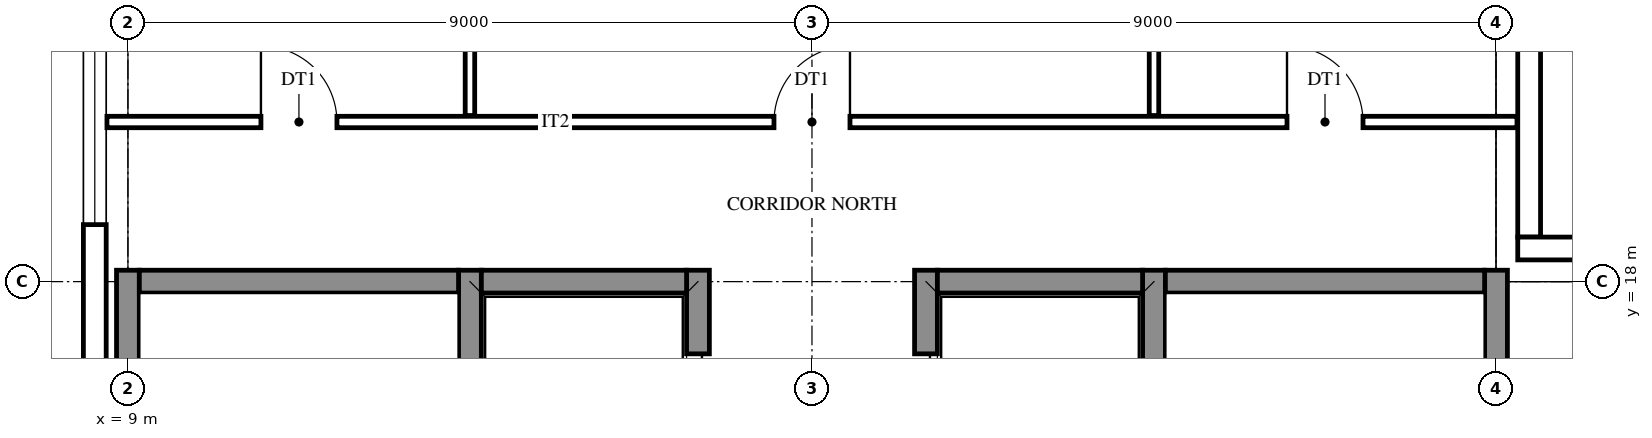
"""IFC4 building model, lengths in metres.
Left out: names, types, materials, properties, quantities, classifications, styles, units other than length and angle.
Written with IfcOpenShell. Run it as: python <this file> out.ifc"""

import sys

from ifc_helpers import new_model, si_unit, direction, frame, frame_2d, origin, place, context, subcontext, project, spatial, rectangle, extrude, element, fill, save


model = new_model("IFC4")
c1 = context("Model", 3, precision=1e-05, world=origin(), true_north=direction((0.0, 1.0)))
c2 = subcontext(c1, "Body", "Model", "MODEL_VIEW")
j1 = project(units=[si_unit("LENGTHUNIT", "METRE"), si_unit("PLANEANGLEUNIT", "RADIAN")], contexts=[c1])
p1 = place(None, origin())
s1 = spatial("IfcSite", under=j1, at=p1, CompositionType="ELEMENT")
p2 = place(p1, origin())
s2 = spatial("IfcBuilding", under=s1, at=p2, CompositionType="ELEMENT")
p3 = place(p2, frame((0.0, 0.0, 65.4)))
s3 = spatial("IfcBuildingStorey", under=s2, at=p3, CompositionType="ELEMENT", Elevation=65.4)
for number, where, z_axis, x_axis in (
    (1, (9.0, 8.85, 0.0), (0.0, 0.0, 1.0), (0.0, 1.0, 0.0)),
    (2, (13.5, 8.85, 0.0), (0.0, 0.0, 1.0), (0.0, 1.0, 0.0)),
):
    element("IfcWall", number, at=place(p3, frame(where, z_axis=z_axis, x_axis=x_axis)), inside=s3, PredefinedType="SHEAR", context=c2, shape_type="SweptSolid", body=[
        extrude(rectangle(XDim=9.3, YDim=0.3, at=frame_2d((4.65, 0.0))), origin(), (0.0, 0.0, 1.0), 4.5),
    ])
p4 = place(p3, frame((16.5, 8.85, 0.0), z_axis=(0.0, 0.0, 1.0), x_axis=(0.0, 1.0, 0.0)))
e3 = element("IfcWall", 3, at=p4, inside=s3, PredefinedType="SHEAR", context=c2, shape_type="SweptSolid", body=[
    extrude(rectangle(XDim=9.3, YDim=0.3, at=frame_2d((4.65, 0.0))), origin(), (0.0, 0.0, 1.0), 4.5),
])
p5 = place(p4, frame((1.1, 0.0, 0.0)))
e4 = element("IfcOpeningElement", 4, at=p5, cuts=e3, PredefinedType="OPENING", context=c2, shape_type="SweptSolid", body=[
    extrude(rectangle(XDim=1.1, YDim=2.1, at=frame_2d((0.55, 1.05))), frame((0.0, 0.16, 0.0), z_axis=(0.0, -1.0, 0.0), x_axis=(1.0, 0.0, 0.0)), (0.0, 0.0, 1.0), 0.32),
])
p6 = place(p4, frame((4.1, 0.0, 0.0)))
e5 = element("IfcOpeningElement", 5, at=p6, cuts=e3, PredefinedType="OPENING", context=c2, shape_type="SweptSolid", body=[
    extrude(rectangle(XDim=1.1, YDim=2.1, at=frame_2d((0.55, 1.05))), frame((0.0, 0.16, 0.0), z_axis=(0.0, -1.0, 0.0), x_axis=(1.0, 0.0, 0.0)), (0.0, 0.0, 1.0), 0.32),
])
p7 = place(p4, frame((7.1, 0.0, 0.0)))
e6 = element("IfcOpeningElement", 6, at=p7, cuts=e3, PredefinedType="OPENING", context=c2, shape_type="SweptSolid", body=[
    extrude(rectangle(XDim=1.1, YDim=2.1, at=frame_2d((0.55, 1.05))), frame((0.0, 0.16, 0.0), z_axis=(0.0, -1.0, 0.0), x_axis=(1.0, 0.0, 0.0)), (0.0, 0.0, 1.0), 0.32),
])
p8 = place(p3, frame((19.5, 8.85, 0.0), z_axis=(0.0, 0.0, 1.0), x_axis=(0.0, 1.0, 0.0)))
e7 = element("IfcWall", 7, at=p8, inside=s3, PredefinedType="SHEAR", context=c2, shape_type="SweptSolid", body=[
    extrude(rectangle(XDim=9.3, YDim=0.3, at=frame_2d((4.65, 0.0))), origin(), (0.0, 0.0, 1.0), 4.5),
])
p9 = place(p8, frame((1.1, 0.0, 0.0)))
e8 = element("IfcOpeningElement", 8, at=p9, cuts=e7, PredefinedType="OPENING", context=c2, shape_type="SweptSolid", body=[
    extrude(rectangle(XDim=1.1, YDim=2.1, at=frame_2d((0.55, 1.05))), frame((0.0, 0.16, 0.0), z_axis=(0.0, -1.0, 0.0), x_axis=(1.0, 0.0, 0.0)), (0.0, 0.0, 1.0), 0.32),
])
p10 = place(p8, frame((3.95, 0.0, 0.0)))
e9 = element("IfcOpeningElement", 9, at=p10, cuts=e7, PredefinedType="OPENING", context=c2, shape_type="SweptSolid", body=[
    extrude(rectangle(XDim=1.4, YDim=2.1, at=frame_2d((0.7, 1.05))), frame((0.0, 0.16, 0.0), z_axis=(0.0, -1.0, 0.0), x_axis=(1.0, 0.0, 0.0)), (0.0, 0.0, 1.0), 0.32),
])
p11 = place(p8, frame((7.1, 0.0, 0.0)))
e10 = element("IfcOpeningElement", 10, at=p11, cuts=e7, PredefinedType="OPENING", context=c2, shape_type="SweptSolid", body=[
    extrude(rectangle(XDim=1.1, YDim=2.1, at=frame_2d((0.55, 1.05))), frame((0.0, 0.16, 0.0), z_axis=(0.0, -1.0, 0.0), x_axis=(1.0, 0.0, 0.0)), (0.0, 0.0, 1.0), 0.32),
])
for number, where, z_axis, x_axis in (
    (11, (22.5, 8.85, 0.0), (0.0, 0.0, 1.0), (0.0, 1.0, 0.0)),
    (12, (27.0, 8.85, 0.0), (0.0, 0.0, 1.0), (0.0, 1.0, 0.0)),
):
    element("IfcWall", number, at=place(p3, frame(where, z_axis=z_axis, x_axis=x_axis)), inside=s3, PredefinedType="SHEAR", context=c2, shape_type="SweptSolid", body=[
        extrude(rectangle(XDim=9.3, YDim=0.3, at=frame_2d((4.65, 0.0))), origin(), (0.0, 0.0, 1.0), 4.5),
    ])
p12 = place(p3, frame((9.15, 18.0, 0.0), z_axis=(0.0, 0.0, 1.0), x_axis=(1.0, 0.0, 0.0)))
e13 = element("IfcWall", 13, at=p12, inside=s3, PredefinedType="SHEAR", context=c2, shape_type="SweptSolid", body=[
    extrude(rectangle(XDim=4.2, YDim=0.3, at=frame_2d((2.1, 0.0))), origin(), (0.0, 0.0, 1.0), 4.5),
])
for number, where, z_axis, x_axis in (
    (14, (13.65, 18.0, 0.0), (0.0, 0.0, 1.0), (1.0, 0.0, 0.0)),
    (15, (19.65, 18.0, 0.0), (0.0, 0.0, 1.0), (1.0, 0.0, 0.0)),
):
    element("IfcWall", number, at=place(p3, frame(where, z_axis=z_axis, x_axis=x_axis)), inside=s3, PredefinedType="SHEAR", context=c2, shape_type="SweptSolid", body=[
        extrude(rectangle(XDim=2.7, YDim=0.3, at=frame_2d((1.35, 0.0))), origin(), (0.0, 0.0, 1.0), 4.5),
    ])
p13 = place(p3, frame((22.65, 18.0, 0.0), z_axis=(0.0, 0.0, 1.0), x_axis=(1.0, 0.0, 0.0)))
e16 = element("IfcWall", 16, at=p13, inside=s3, PredefinedType="SHEAR", context=c2, shape_type="SweptSolid", body=[
    extrude(rectangle(XDim=4.2, YDim=0.3, at=frame_2d((2.1, 0.0))), origin(), (0.0, 0.0, 1.0), 4.5),
])
p14 = place(p3, frame((8.564, -0.286, 0.0), z_axis=(0.0, 0.0, 1.0), x_axis=(0.0, 1.0, 0.0)))
e17 = element("IfcWall", 17, at=p14, inside=s3, PredefinedType="STANDARD", context=c2, shape_type="SweptSolid", body=[
    extrude(rectangle(XDim=27.572, YDim=0.3, at=frame_2d((13.786, 0.0))), origin(), (0.0, 0.0, 1.0), 4.5),
])
p15 = place(p14, frame((1.036, 0.0, 0.6)))
e18 = element("IfcOpeningElement", 18, at=p15, cuts=e17, PredefinedType="OPENING", context=c2, shape_type="SweptSolid", body=[
    extrude(rectangle(XDim=3.0, YDim=3.1, at=frame_2d((1.5, 1.55))), frame((0.0, 0.16, 0.0), z_axis=(0.0, -1.0, 0.0), x_axis=(1.0, 0.0, 0.0)), (0.0, 0.0, 1.0), 0.32),
])
p16 = place(p14, frame((5.536, 0.0, 0.6)))
e19 = element("IfcOpeningElement", 19, at=p16, cuts=e17, PredefinedType="OPENING", context=c2, shape_type="SweptSolid", body=[
    extrude(rectangle(XDim=3.0, YDim=3.1, at=frame_2d((1.5, 1.55))), frame((0.0, 0.16, 0.0), z_axis=(0.0, -1.0, 0.0), x_axis=(1.0, 0.0, 0.0)), (0.0, 0.0, 1.0), 0.32),
])
p17 = place(p14, frame((19.036, 0.0, 0.6)))
e20 = element("IfcOpeningElement", 20, at=p17, cuts=e17, PredefinedType="OPENING", context=c2, shape_type="SweptSolid", body=[
    extrude(rectangle(XDim=3.0, YDim=3.1, at=frame_2d((1.5, 1.55))), frame((0.0, 0.16, 0.0), z_axis=(0.0, -1.0, 0.0), x_axis=(1.0, 0.0, 0.0)), (0.0, 0.0, 1.0), 0.32),
])
p18 = place(p14, frame((23.536, 0.0, 0.6)))
e21 = element("IfcOpeningElement", 21, at=p18, cuts=e17, PredefinedType="OPENING", context=c2, shape_type="SweptSolid", body=[
    extrude(rectangle(XDim=3.0, YDim=3.1, at=frame_2d((1.5, 1.55))), frame((0.0, 0.16, 0.0), z_axis=(0.0, -1.0, 0.0), x_axis=(1.0, 0.0, 0.0)), (0.0, 0.0, 1.0), 0.32),
])
p19 = place(p3, frame((27.436, 27.286, 0.0), z_axis=(0.0, 0.0, 1.0), x_axis=(0.0, -1.0, 0.0)))
e22 = element("IfcWall", 22, at=p19, inside=s3, PredefinedType="STANDARD", context=c2, shape_type="SweptSolid", body=[
    extrude(rectangle(XDim=8.7, YDim=0.3, at=frame_2d((4.35, 0.0))), origin(), (0.0, 0.0, 1.0), 4.5),
])
p20 = place(p19, frame((3.586, 0.0, 0.012)))
e23 = element("IfcOpeningElement", 23, at=p20, cuts=e22, PredefinedType="OPENING", context=c2, shape_type="SweptSolid", body=[
    extrude(rectangle(XDim=2.4, YDim=2.4, at=frame_2d((1.2, 1.2))), frame((0.0, 0.16, 0.0), z_axis=(0.0, -1.0, 0.0), x_axis=(1.0, 0.0, 0.0)), (0.0, 0.0, 1.0), 0.32),
])
p21 = place(p3, frame((27.286, 18.436, 0.0), z_axis=(0.0, 0.0, 1.0), x_axis=(1.0, 0.0, 0.0)))
e24 = element("IfcWall", 24, at=p21, inside=s3, PredefinedType="STANDARD", context=c2, shape_type="SweptSolid", body=[
    extrude(rectangle(XDim=4.789, YDim=0.3, at=frame_2d((2.395, 0.0))), origin(), (0.0, 0.0, 1.0), 4.5),
])
p22 = place(p3, frame((13.5, 20.185, 0.0), z_axis=(0.0, 0.0, 1.0), x_axis=(0.0, 1.0, 0.0)))
e25 = element("IfcWall", 25, at=p22, inside=s3, PredefinedType="PARTITIONING", context=c2, shape_type="SweptSolid", body=[
    extrude(rectangle(XDim=7.091, YDim=0.125, at=frame_2d((3.545, 0.0))), origin(), (0.0, 0.0, 1.0), 3.723),
])
p23 = place(p3, frame((22.5, 20.185, 0.0), z_axis=(0.0, 0.0, 1.0), x_axis=(0.0, 1.0, 0.0)))
e26 = element("IfcWall", 26, at=p23, inside=s3, PredefinedType="PARTITIONING", context=c2, shape_type="SweptSolid", body=[
    extrude(rectangle(XDim=7.091, YDim=0.125, at=frame_2d((3.545, 0.0))), origin(), (0.0, 0.0, 1.0), 3.723),
])
p24 = place(p23, frame((2.865, 0.0, 0.0)))
e27 = element("IfcOpeningElement", 27, at=p24, cuts=e26, PredefinedType="OPENING", context=c2, shape_type="SweptSolid", body=[
    extrude(rectangle(XDim=1.0, YDim=2.1, at=frame_2d((0.5, 1.05))), frame((0.0, 0.073, 0.0), z_axis=(0.0, -1.0, 0.0), x_axis=(1.0, 0.0, 0.0)), (0.0, 0.0, 1.0), 0.145),
])
p25 = place(p3, frame((8.724, 20.1, 0.0), z_axis=(0.0, 0.0, 1.0), x_axis=(1.0, 0.0, 0.0)))
e28 = element("IfcWall", 28, at=p25, inside=s3, PredefinedType="PARTITIONING", context=c2, shape_type="SweptSolid", body=[
    extrude(rectangle(XDim=18.552, YDim=0.15, at=frame_2d((9.276, 0.0))), origin(), (0.0, 0.0, 1.0), 3.723),
])
p26 = place(p25, frame((2.026, 0.0, 0.0)))
e29 = element("IfcOpeningElement", 29, at=p26, cuts=e28, PredefinedType="OPENING", context=c2, shape_type="SweptSolid", body=[
    extrude(rectangle(XDim=1.0, YDim=2.1, at=frame_2d((0.5, 1.05))), frame((0.0, 0.085, 0.0), z_axis=(0.0, -1.0, 0.0), x_axis=(1.0, 0.0, 0.0)), (0.0, 0.0, 1.0), 0.17),
])
p27 = place(p25, frame((8.776, 0.0, 0.0)))
e30 = element("IfcOpeningElement", 30, at=p27, cuts=e28, PredefinedType="OPENING", context=c2, shape_type="SweptSolid", body=[
    extrude(rectangle(XDim=1.0, YDim=2.1, at=frame_2d((0.5, 1.05))), frame((0.0, 0.085, 0.0), z_axis=(0.0, -1.0, 0.0), x_axis=(1.0, 0.0, 0.0)), (0.0, 0.0, 1.0), 0.17),
])
p28 = place(p25, frame((15.526, 0.0, 0.0)))
e31 = element("IfcOpeningElement", 31, at=p28, cuts=e28, PredefinedType="OPENING", context=c2, shape_type="SweptSolid", body=[
    extrude(rectangle(XDim=1.0, YDim=2.1, at=frame_2d((0.5, 1.05))), frame((0.0, 0.085, 0.0), z_axis=(0.0, -1.0, 0.0), x_axis=(1.0, 0.0, 0.0)), (0.0, 0.0, 1.0), 0.17),
])
p29 = place(p17, origin())
e32 = element("IfcWindow", 32, at=p29, inside=s3, PartitioningType="SINGLE_PANEL", PredefinedType="WINDOW", context=c2, shape_type="SweptSolid", body=[
    extrude(rectangle(XDim=3.0, YDim=3.1, at=frame_2d((1.5, 1.55))), frame((0.0, 0.03, 0.0), z_axis=(0.0, -1.0, 0.0), x_axis=(1.0, 0.0, 0.0)), (0.0, 0.0, 1.0), 0.06),
])
fill(e20, e32)
p30 = place(p26, origin())
e33 = element("IfcDoor", 33, at=p30, inside=s3, OperationType="SINGLE_SWING_LEFT", PredefinedType="DOOR", context=c2, shape_type="SweptSolid", body=[
    extrude(rectangle(XDim=1.0, YDim=2.1, at=frame_2d((0.5, 1.05))), frame((0.0, 0.025, 0.0), z_axis=(0.0, -1.0, 0.0), x_axis=(1.0, 0.0, 0.0)), (0.0, 0.0, 1.0), 0.05),
])
fill(e29, e33)
p31 = place(p27, origin())
e34 = element("IfcDoor", 34, at=p31, inside=s3, OperationType="SINGLE_SWING_RIGHT", PredefinedType="DOOR", context=c2, shape_type="SweptSolid", body=[
    extrude(rectangle(XDim=1.0, YDim=2.1, at=frame_2d((0.5, 1.05))), frame((0.0, 0.025, 0.0), z_axis=(0.0, -1.0, 0.0), x_axis=(1.0, 0.0, 0.0)), (0.0, 0.0, 1.0), 0.05),
])
fill(e30, e34)
p32 = place(p28, origin())
e35 = element("IfcDoor", 35, at=p32, inside=s3, OperationType="SINGLE_SWING_LEFT", PredefinedType="DOOR", context=c2, shape_type="SweptSolid", body=[
    extrude(rectangle(XDim=1.0, YDim=2.1, at=frame_2d((0.5, 1.05))), frame((0.0, 0.025, 0.0), z_axis=(0.0, -1.0, 0.0), x_axis=(1.0, 0.0, 0.0)), (0.0, 0.0, 1.0), 0.05),
])
fill(e31, e35)
p33 = place(p7, origin())
e36 = element("IfcDoor", 36, at=p33, inside=s3, OperationType="DOUBLE_DOOR_SLIDING", PredefinedType="DOOR", context=c2, shape_type="SweptSolid", body=[
    extrude(rectangle(XDim=1.1, YDim=2.1, at=frame_2d((0.55, 1.05))), frame((0.0, 0.025, 0.0), z_axis=(0.0, -1.0, 0.0), x_axis=(1.0, 0.0, 0.0)), (0.0, 0.0, 1.0), 0.05),
])
fill(e6, e36)
p34 = place(p11, origin())
e37 = element("IfcDoor", 37, at=p34, inside=s3, OperationType="DOUBLE_DOOR_SLIDING", PredefinedType="DOOR", context=c2, shape_type="SweptSolid", body=[
    extrude(rectangle(XDim=1.1, YDim=2.1, at=frame_2d((0.55, 1.05))), frame((0.0, 0.025, 0.0), z_axis=(0.0, -1.0, 0.0), x_axis=(1.0, 0.0, 0.0)), (0.0, 0.0, 1.0), 0.05),
])
fill(e10, e37)
save(model, sys.argv[1])
